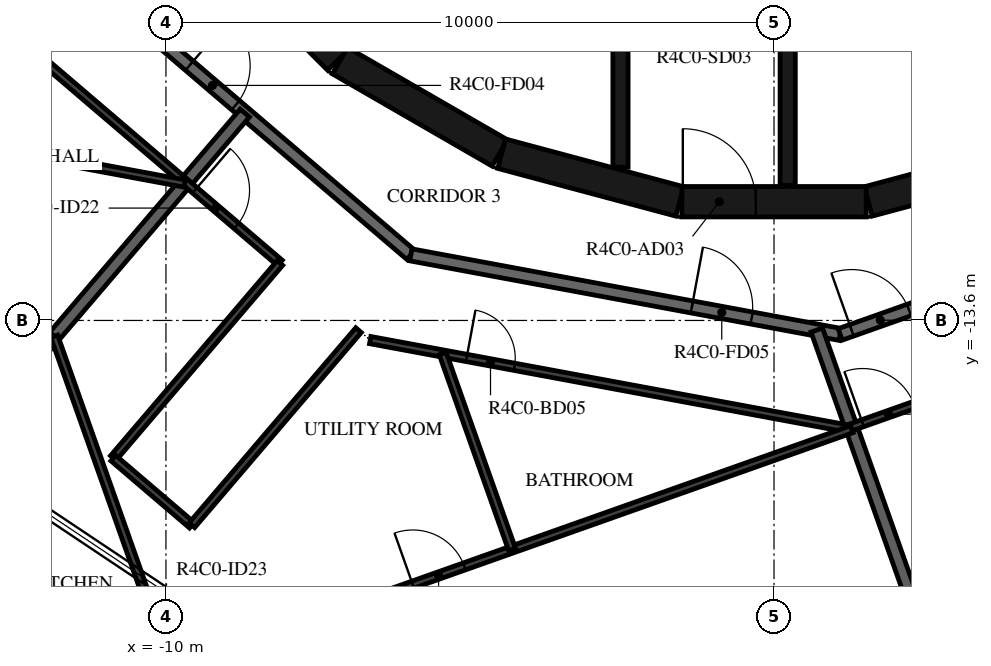
"""IFC4 building model, lengths in metres.
Left out: names, types, materials, properties, quantities, classifications, styles, units other than length and angle.
Written with IfcOpenShell. Run it as: python <this file> out.ifc"""

import sys

from ifc_helpers import new_model, si_unit, direction, frame, frame_2d, origin, place, context, subcontext, project, spatial, rectangle, extrude, element, fill, save


model = new_model("IFC4")
c1 = context("Model", 3, precision=1e-05, world=origin(), true_north=direction((0.0, 1.0)))
c2 = subcontext(c1, "Body", "Model", "MODEL_VIEW")
j1 = project(units=[si_unit("LENGTHUNIT", "METRE"), si_unit("PLANEANGLEUNIT", "RADIAN")], contexts=[c1])
p1 = place(None, origin())
s1 = spatial("IfcSite", under=j1, at=p1, CompositionType="ELEMENT")
p2 = place(p1, origin())
s2 = spatial("IfcBuilding", under=s1, at=p2, CompositionType="ELEMENT")
p3 = place(p2, frame((0.0, 0.0, 179.7)))
s3 = spatial("IfcBuildingStorey", under=s2, at=p3, CompositionType="ELEMENT", Elevation=179.7)
p4 = place(p3, frame((1.55, -11.643, 0.0), z_axis=(0.0, 0.0, 1.0), x_axis=(0.965948410781, 0.258734743916, 0.0)))
e1 = element("IfcWall", 1, at=p4, inside=s3, PredefinedType="SHEAR", context=c2, shape_type="SweptSolid", body=[
    extrude(rectangle(XDim=3.033, YDim=0.5, at=frame_2d((1.516, 0.0))), origin(), (0.0, 0.0, 1.0), 3.05),
])
p5 = place(p3, frame((-9.308, -7.164, 0.0), z_axis=(0.0, 0.0, 1.0), x_axis=(0.707106781187, -0.707106781187, 0.0)))
e2 = element("IfcWall", 2, at=p5, inside=s3, PredefinedType="SHEAR", context=c2, shape_type="SweptSolid", body=[
    extrude(rectangle(XDim=3.032, YDim=0.5, at=frame_2d((1.516, 0.0))), origin(), (0.0, 0.0, 1.0), 3.05),
])
for number, where, z_axis, x_axis in (
    (3, (-7.137, -9.329, 0.0), (0.0, 0.0, 1.0), (0.866, -0.5, 0.0)),
    (4, (-4.479, -10.858, 0.0), (0.0, 0.0, 1.0), (0.966, -0.259, 0.0)),
):
    element("IfcWall", number, at=place(p3, frame(where, z_axis=z_axis, x_axis=x_axis)), inside=s3, PredefinedType="SHEAR", context=c2, shape_type="SweptSolid", body=[
        extrude(rectangle(XDim=3.033, YDim=0.5, at=frame_2d((1.516, 0.0))), origin(), (0.0, 0.0, 1.0), 3.05),
    ])
p6 = place(p3, frame((-1.516, -11.647, 0.0), z_axis=(0.0, 0.0, 1.0), x_axis=(1.0, 0.0, 0.0)))
e5 = element("IfcWall", 5, at=p6, inside=s3, PredefinedType="SHEAR", context=c2, shape_type="SweptSolid", body=[
    extrude(rectangle(XDim=3.033, YDim=0.5, at=frame_2d((1.516, 0.0))), origin(), (0.0, 0.0, 1.0), 3.05),
])
p7 = place(p6, frame((0.016, 0.0, 0.0)))
e6 = element("IfcOpeningElement", 6, at=p7, cuts=e5, PredefinedType="OPENING", context=c2, shape_type="SweptSolid", body=[
    extrude(rectangle(XDim=1.2, YDim=2.1, at=frame_2d((0.6, 1.05))), frame((0.0, 0.26, 0.0), z_axis=(0.0, -1.0, 0.0), x_axis=(1.0, 0.0, 0.0)), (0.0, 0.0, 1.0), 0.52),
])
p8 = place(p3, frame((-2.525, -8.97, 0.0), z_axis=(0.0, 0.0, 1.0), x_axis=(0.0, -1.0, 0.0)))
e7 = element("IfcWall", 7, at=p8, inside=s3, PredefinedType="SHEAR", context=c2, shape_type="SweptSolid", body=[
    extrude(rectangle(XDim=2.11, YDim=0.25, at=frame_2d((1.055, 0.0))), origin(), (0.0, 0.0, 1.0), 3.05),
])
p9 = place(p3, frame((0.225, -8.97, 0.0), z_axis=(0.0, 0.0, 1.0), x_axis=(0.0, -1.0, 0.0)))
e8 = element("IfcWall", 8, at=p9, inside=s3, PredefinedType="SHEAR", context=c2, shape_type="SweptSolid", body=[
    extrude(rectangle(XDim=2.41, YDim=0.25, at=frame_2d((1.205, 0.0))), origin(), (0.0, 0.0, 1.0), 3.05),
])
p10 = place(p3, frame((-11.433, -7.858, 0.0), z_axis=(0.0, 0.0, 1.0), x_axis=(0.760412154545, -0.649440801937, 0.0)))
e9 = element("IfcWall", 9, at=p10, inside=s3, PredefinedType="STANDARD", context=c2, shape_type="SweptSolid", body=[
    extrude(rectangle(XDim=7.181, YDim=0.2, at=frame_2d((3.59, 0.0))), origin(), (0.0, 0.0, 1.0), 3.05),
])
p11 = place(p10, frame((2.39, 0.0, 0.0)))
e10 = element("IfcOpeningElement", 10, at=p11, cuts=e9, PredefinedType="OPENING", context=c2, shape_type="SweptSolid", body=[
    extrude(rectangle(XDim=1.0, YDim=2.1, at=frame_2d((0.5, 1.05))), frame((0.0, 0.11, 0.0), z_axis=(0.0, -1.0, 0.0), x_axis=(1.0, 0.0, 0.0)), (0.0, 0.0, 1.0), 0.22),
])
p12 = place(p3, frame((-5.972, -12.521, 0.0), z_axis=(0.0, 0.0, 1.0), x_axis=(0.983256068163, -0.18222926335, 0.0)))
e11 = element("IfcWall", 11, at=p12, inside=s3, PredefinedType="STANDARD", context=c2, shape_type="SweptSolid", body=[
    extrude(rectangle(XDim=7.181, YDim=0.2, at=frame_2d((3.59, 0.0))), origin(), (0.0, 0.0, 1.0), 3.05),
])
p13 = place(p12, frame((4.7, 0.0, 0.0)))
e12 = element("IfcOpeningElement", 12, at=p13, cuts=e11, PredefinedType="OPENING", context=c2, shape_type="SweptSolid", body=[
    extrude(rectangle(XDim=1.0, YDim=2.1, at=frame_2d((0.5, 1.05))), frame((0.0, 0.11, 0.0), z_axis=(0.0, -1.0, 0.0), x_axis=(1.0, 0.0, 0.0)), (0.0, 0.0, 1.0), 0.22),
])
p14 = place(p3, frame((1.088, -13.83, 0.0), z_axis=(0.0, 0.0, 1.0), x_axis=(0.942648397945, 0.333787354241, 0.0)))
e13 = element("IfcWall", 13, at=p14, inside=s3, PredefinedType="STANDARD", context=c2, shape_type="SweptSolid", body=[
    extrude(rectangle(XDim=7.181, YDim=0.2, at=frame_2d((3.591, 0.0))), origin(), (0.0, 0.0, 1.0), 3.05),
])
p15 = place(p14, frame((0.2, 0.0, 0.0)))
e14 = element("IfcOpeningElement", 14, at=p15, cuts=e13, PredefinedType="OPENING", context=c2, shape_type="SweptSolid", body=[
    extrude(rectangle(XDim=1.0, YDim=2.1, at=frame_2d((0.5, 1.05))), frame((0.0, 0.11, 0.0), z_axis=(0.0, -1.0, 0.0), x_axis=(1.0, 0.0, 0.0)), (0.0, 0.0, 1.0), 0.22),
])
p16 = place(p3, frame((-11.838, -13.86, 0.0), z_axis=(0.0, 0.0, 1.0), x_axis=(0.64944503311, 0.760408540831, 0.0)))
e15 = element("IfcWall", 15, at=p16, inside=s3, PredefinedType="STANDARD", context=c2, shape_type="SweptSolid", body=[
    extrude(rectangle(XDim=4.827, YDim=0.2, at=frame_2d((2.414, 0.0))), origin(), (0.0, 0.0, 1.0), 3.05),
])
p17 = place(p3, frame((-12.443, -14.569, 0.0), z_axis=(0.0, 0.0, 1.0), x_axis=(0.649517408851, 0.760346720648, 0.0)))
e16 = element("IfcWall", 16, at=p17, inside=s3, PredefinedType="STANDARD", context=c2, shape_type="SweptSolid", body=[
    extrude(rectangle(XDim=0.932, YDim=0.2, at=frame_2d((0.466, 0.0))), origin(), (0.0, 0.0, 1.0), 3.05),
])
p18 = place(p3, frame((2.482, -18.782, 0.0), z_axis=(0.0, 0.0, 1.0), x_axis=(-0.333807281402, 0.942641341594, 0.0)))
e17 = element("IfcWall", 17, at=p18, inside=s3, PredefinedType="STANDARD", context=c2, shape_type="SweptSolid", body=[
    extrude(rectangle(XDim=5.329, YDim=0.2, at=frame_2d((2.665, 0.0))), origin(), (0.0, 0.0, 1.0), 3.05),
])
p19 = place(p3, frame((-12.713, -8.737, 0.0), z_axis=(0.0, 0.0, 1.0), x_axis=(0.760432387723, -0.649417110725, 0.0)))
e18 = element("IfcWall", 18, at=p19, inside=s3, PredefinedType="PARTITIONING", context=c2, shape_type="SweptSolid", body=[
    extrude(rectangle(XDim=6.032, YDim=0.12, at=frame_2d((3.016, 0.0))), origin(), (0.0, 0.0, 1.0), 3.05),
])
p20 = place(p19, frame((4.192, 0.0, 0.0)))
e19 = element("IfcOpeningElement", 19, at=p20, cuts=e18, PredefinedType="OPENING", context=c2, shape_type="SweptSolid", body=[
    extrude(rectangle(XDim=0.9, YDim=2.1, at=frame_2d((0.45, 1.05))), frame((0.0, 0.07, 0.0), z_axis=(0.0, -1.0, 0.0), x_axis=(1.0, 0.0, 0.0)), (0.0, 0.0, 1.0), 0.14),
])
p21 = place(p3, frame((-16.252, -10.133, 0.0), z_axis=(0.0, 0.0, 1.0), x_axis=(0.983256998026, -0.182224246005, 0.0)))
e20 = element("IfcWall", 20, at=p21, inside=s3, PredefinedType="PARTITIONING", context=c2, shape_type="SweptSolid", body=[
    extrude(rectangle(XDim=6.671, YDim=0.12, at=frame_2d((3.335, 0.0))), origin(), (0.0, 0.0, 1.0), 3.05),
])
p22 = place(p21, frame((0.2, 0.0, 0.0)))
e21 = element("IfcOpeningElement", 21, at=p22, cuts=e20, PredefinedType="OPENING", context=c2, shape_type="SweptSolid", body=[
    extrude(rectangle(XDim=0.9, YDim=2.1, at=frame_2d((0.45, 1.05))), frame((0.0, 0.07, 0.0), z_axis=(0.0, -1.0, 0.0), x_axis=(1.0, 0.0, 0.0)), (0.0, 0.0, 1.0), 0.14),
])
p23 = place(p3, frame((-8.125, -12.655, 0.0), z_axis=(0.0, 0.0, 1.0), x_axis=(-0.649441944702, -0.760411178549, 0.0)))
e22 = element("IfcWall", 22, at=p23, inside=s3, PredefinedType="PARTITIONING", context=c2, shape_type="SweptSolid", body=[
    extrude(rectangle(XDim=4.22, YDim=0.12, at=frame_2d((2.11, 0.0))), origin(), (0.0, 0.0, 1.0), 3.05),
])
p24 = place(p3, frame((-10.866, -15.864, 0.0), z_axis=(0.0, 0.0, 1.0), x_axis=(0.760431300628, -0.649418383652, 0.0)))
e23 = element("IfcWall", 23, at=p24, inside=s3, PredefinedType="PARTITIONING", context=c2, shape_type="SweptSolid", body=[
    extrude(rectangle(XDim=1.7, YDim=0.12, at=frame_2d((0.85, 0.0))), origin(), (0.0, 0.0, 1.0), 3.05),
])
p25 = place(p3, frame((-9.573, -16.968, 0.0), z_axis=(0.0, 0.0, 1.0), x_axis=(0.649437062208, 0.760415348498, 0.0)))
e24 = element("IfcWall", 24, at=p25, inside=s3, PredefinedType="PARTITIONING", context=c2, shape_type="SweptSolid", body=[
    extrude(rectangle(XDim=4.219, YDim=0.12, at=frame_2d((2.11, 0.0))), origin(), (0.0, 0.0, 1.0), 3.05),
])
p26 = place(p3, frame((-6.641, -13.923, 0.0), z_axis=(0.0, 0.0, 1.0), x_axis=(0.983250157272, -0.182261153912, 0.0)))
e25 = element("IfcWall", 25, at=p26, inside=s3, PredefinedType="PARTITIONING", context=c2, shape_type="SweptSolid", body=[
    extrude(rectangle(XDim=7.985, YDim=0.12, at=frame_2d((3.992, 0.0))), origin(), (0.0, 0.0, 1.0), 3.05),
])
p27 = place(p26, frame((1.612, 0.0, 0.0)))
e26 = element("IfcOpeningElement", 26, at=p27, cuts=e25, PredefinedType="OPENING", context=c2, shape_type="SweptSolid", body=[
    extrude(rectangle(XDim=0.8, YDim=2.1, at=frame_2d((0.4, 1.05))), frame((0.0, 0.07, 0.0), z_axis=(0.0, -1.0, 0.0), x_axis=(1.0, 0.0, 0.0)), (0.0, 0.0, 1.0), 0.14),
])
p28 = place(p3, frame((-12.015, -20.096, 0.0), z_axis=(0.0, 0.0, 1.0), x_axis=(0.942638913957, 0.33381413675, 0.0)))
e27 = element("IfcWall", 27, at=p28, inside=s3, PredefinedType="PARTITIONING", context=c2, shape_type="SweptSolid", body=[
    extrude(rectangle(XDim=14.104, YDim=0.12, at=frame_2d((7.052, 0.0))), origin(), (0.0, 0.0, 1.0), 3.05),
])
p29 = place(p28, frame((2.814, 0.0, 0.0)))
e28 = element("IfcOpeningElement", 28, at=p29, cuts=e27, PredefinedType="OPENING", context=c2, shape_type="SweptSolid", body=[
    extrude(rectangle(XDim=0.9, YDim=2.1, at=frame_2d((0.45, 1.05))), frame((0.0, 0.07, 0.0), z_axis=(0.0, -1.0, 0.0), x_axis=(1.0, 0.0, 0.0)), (0.0, 0.0, 1.0), 0.14),
])
p30 = place(p28, frame((6.444, 0.0, 0.0)))
e29 = element("IfcOpeningElement", 29, at=p30, cuts=e27, PredefinedType="OPENING", context=c2, shape_type="SweptSolid", body=[
    extrude(rectangle(XDim=0.9, YDim=2.1, at=frame_2d((0.45, 1.05))), frame((0.0, 0.07, 0.0), z_axis=(0.0, -1.0, 0.0), x_axis=(1.0, 0.0, 0.0)), (0.0, 0.0, 1.0), 0.14),
])
p31 = place(p28, frame((0.2, 0.0, 0.0)))
e30 = element("IfcOpeningElement", 30, at=p31, cuts=e27, PredefinedType="OPENING", context=c2, shape_type="SweptSolid", body=[
    extrude(rectangle(XDim=0.9, YDim=2.1, at=frame_2d((0.45, 1.05))), frame((0.0, 0.07, 0.0), z_axis=(0.0, -1.0, 0.0), x_axis=(1.0, 0.0, 0.0)), (0.0, 0.0, 1.0), 0.14),
])
p32 = place(p3, frame((-9.895, -19.346, 0.0), z_axis=(0.0, 0.0, 1.0), x_axis=(-0.333781129158, 0.942650602195, 0.0)))
e31 = element("IfcWall", 31, at=p32, inside=s3, PredefinedType="PARTITIONING", context=c2, shape_type="SweptSolid", body=[
    extrude(rectangle(XDim=5.819, YDim=0.12, at=frame_2d((2.91, 0.0))), origin(), (0.0, 0.0, 1.0), 3.05),
])
p33 = place(p32, frame((0.2, 0.0, 0.0)))
e32 = element("IfcOpeningElement", 32, at=p33, cuts=e31, PredefinedType="OPENING", context=c2, shape_type="SweptSolid", body=[
    extrude(rectangle(XDim=0.9, YDim=2.1, at=frame_2d((0.45, 1.05))), frame((0.0, 0.07, 0.0), z_axis=(0.0, -1.0, 0.0), x_axis=(1.0, 0.0, 0.0)), (0.0, 0.0, 1.0), 0.14),
])
p34 = place(p3, frame((-4.308, -17.367, 0.0), z_axis=(0.0, 0.0, 1.0), x_axis=(-0.333802202677, 0.942643140052, 0.0)))
e33 = element("IfcWall", 33, at=p34, inside=s3, PredefinedType="PARTITIONING", context=c2, shape_type="SweptSolid", body=[
    extrude(rectangle(XDim=3.419, YDim=0.12, at=frame_2d((1.709, 0.0))), origin(), (0.0, 0.0, 1.0), 3.05),
])
p35 = place(p3, frame((1.269, -15.357, 0.0), z_axis=(0.0, 0.0, 1.0), x_axis=(0.942639442898, 0.333812643101, 0.0)))
e34 = element("IfcWall", 34, at=p35, inside=s3, PredefinedType="PARTITIONING", context=c2, shape_type="SweptSolid", body=[
    extrude(rectangle(XDim=7.86, YDim=0.12, at=frame_2d((3.93, 0.0))), origin(), (0.0, 0.0, 1.0), 3.05),
])
p36 = place(p35, frame((0.2, 0.0, 0.0)))
e35 = element("IfcOpeningElement", 35, at=p36, cuts=e34, PredefinedType="OPENING", context=c2, shape_type="SweptSolid", body=[
    extrude(rectangle(XDim=0.9, YDim=2.1, at=frame_2d((0.45, 1.05))), frame((0.0, 0.07, 0.0), z_axis=(0.0, -1.0, 0.0), x_axis=(1.0, 0.0, 0.0)), (0.0, 0.0, 1.0), 0.14),
])
p37 = place(p7, origin())
e36 = element("IfcDoor", 36, at=p37, inside=s3, OperationType="SINGLE_SWING_RIGHT", PredefinedType="DOOR", context=c2, shape_type="SweptSolid", body=[
    extrude(rectangle(XDim=1.2, YDim=2.1, at=frame_2d((0.6, 1.05))), frame((0.0, 0.025, 0.0), z_axis=(0.0, -1.0, 0.0), x_axis=(1.0, 0.0, 0.0)), (0.0, 0.0, 1.0), 0.05),
])
fill(e6, e36)
p38 = place(p11, origin())
e37 = element("IfcDoor", 37, at=p38, inside=s3, OperationType="SINGLE_SWING_RIGHT", PredefinedType="DOOR", context=c2, shape_type="SweptSolid", body=[
    extrude(rectangle(XDim=1.0, YDim=2.1, at=frame_2d((0.5, 1.05))), frame((0.0, 0.025, 0.0), z_axis=(0.0, -1.0, 0.0), x_axis=(1.0, 0.0, 0.0)), (0.0, 0.0, 1.0), 0.05),
])
fill(e10, e37)
p39 = place(p13, origin())
e38 = element("IfcDoor", 38, at=p39, inside=s3, OperationType="SINGLE_SWING_LEFT", PredefinedType="DOOR", context=c2, shape_type="SweptSolid", body=[
    extrude(rectangle(XDim=1.0, YDim=2.1, at=frame_2d((0.5, 1.05))), frame((0.0, 0.025, 0.0), z_axis=(0.0, -1.0, 0.0), x_axis=(1.0, 0.0, 0.0)), (0.0, 0.0, 1.0), 0.05),
])
fill(e12, e38)
p40 = place(p20, origin())
e39 = element("IfcDoor", 39, at=p40, inside=s3, OperationType="SINGLE_SWING_LEFT", PredefinedType="DOOR", context=c2, shape_type="SweptSolid", body=[
    extrude(rectangle(XDim=0.9, YDim=2.1, at=frame_2d((0.45, 1.05))), frame((0.0, 0.025, 0.0), z_axis=(0.0, -1.0, 0.0), x_axis=(1.0, 0.0, 0.0)), (0.0, 0.0, 1.0), 0.05),
])
fill(e19, e39)
p41 = place(p27, origin())
e40 = element("IfcDoor", 40, at=p41, inside=s3, OperationType="SINGLE_SWING_LEFT", PredefinedType="DOOR", context=c2, shape_type="SweptSolid", body=[
    extrude(rectangle(XDim=0.8, YDim=2.1, at=frame_2d((0.4, 1.05))), frame((0.0, 0.025, 0.0), z_axis=(0.0, -1.0, 0.0), x_axis=(1.0, 0.0, 0.0)), (0.0, 0.0, 1.0), 0.05),
])
fill(e26, e40)
p42 = place(p30, origin())
e41 = element("IfcDoor", 41, at=p42, inside=s3, OperationType="SINGLE_SWING_LEFT", PredefinedType="DOOR", context=c2, shape_type="SweptSolid", body=[
    extrude(rectangle(XDim=0.9, YDim=2.1, at=frame_2d((0.45, 1.05))), frame((0.0, 0.025, 0.0), z_axis=(0.0, -1.0, 0.0), x_axis=(1.0, 0.0, 0.0)), (0.0, 0.0, 1.0), 0.05),
])
fill(e29, e41)
p43 = place(p15, origin())
e42 = element("IfcDoor", 42, at=p43, inside=s3, OperationType="SINGLE_SWING_LEFT", PredefinedType="DOOR", context=c2, shape_type="SweptSolid", body=[
    extrude(rectangle(XDim=1.0, YDim=2.1, at=frame_2d((0.5, 1.05))), frame((0.0, 0.025, 0.0), z_axis=(0.0, -1.0, 0.0), x_axis=(1.0, 0.0, 0.0)), (0.0, 0.0, 1.0), 0.05),
])
fill(e14, e42)
p44 = place(p36, origin())
e43 = element("IfcDoor", 43, at=p44, inside=s3, OperationType="SINGLE_SWING_LEFT", PredefinedType="DOOR", context=c2, shape_type="SweptSolid", body=[
    extrude(rectangle(XDim=0.9, YDim=2.1, at=frame_2d((0.45, 1.05))), frame((0.0, 0.025, 0.0), z_axis=(0.0, -1.0, 0.0), x_axis=(1.0, 0.0, 0.0)), (0.0, 0.0, 1.0), 0.05),
])
fill(e35, e43)
save(model, sys.argv[1])
